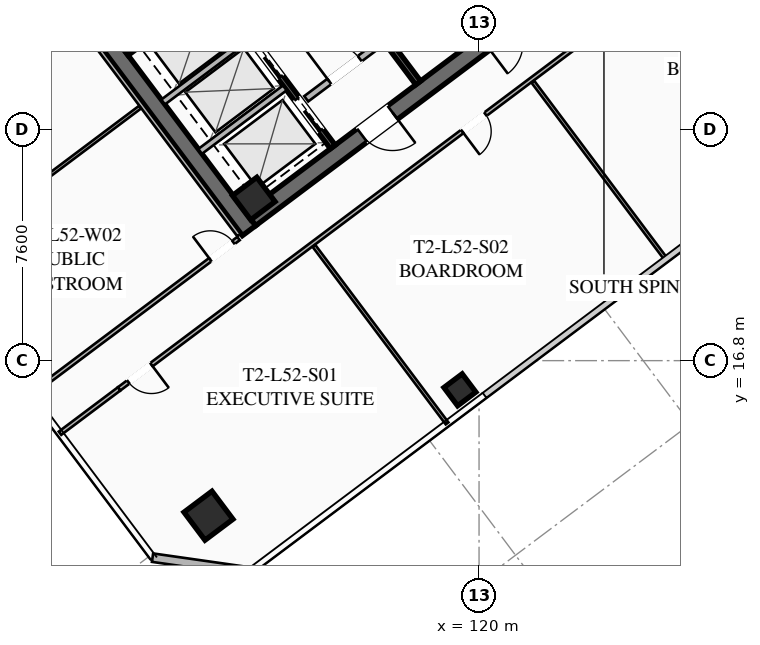
"""IFC4 building model, lengths in metres.
Left out: names, types, materials, properties, quantities, classifications, styles, units other than length and angle.
Written with IfcOpenShell. Run it as: python <this file> out.ifc"""

import sys

from ifc_helpers import new_model, si_unit, direction, frame, frame_2d, origin, origin_2d, place, context, subcontext, project, spatial, rectangle, hollow_rectangle, extrude, element, fill, save


model = new_model("IFC4")
c1 = context("Model", 3, precision=1e-05, world=origin(), true_north=direction((0.0, 1.0)))
c2 = subcontext(c1, "Body", "Model", "MODEL_VIEW")
j1 = project(units=[si_unit("LENGTHUNIT", "METRE"), si_unit("PLANEANGLEUNIT", "RADIAN")], contexts=[c1])
p1 = place(None, origin())
s1 = spatial("IfcSite", under=j1, at=p1, CompositionType="ELEMENT")
p2 = place(p1, origin())
s2 = spatial("IfcBuilding", under=s1, at=p2, CompositionType="ELEMENT")
p3 = place(p2, frame((0.0, 0.0, 192.5)))
s3 = spatial("IfcBuildingStorey", under=s2, at=p3, CompositionType="ELEMENT", Elevation=192.5)
p4 = place(p3, frame((112.436, 21.077, 0.0), z_axis=(0.0, 0.0, 1.0), x_axis=(-0.600005007985, 0.799996243986, 0.0)))
e1 = element("IfcWall", 1, at=p4, inside=s3, PredefinedType="SHEAR", context=c2, shape_type="SweptSolid", body=[
    extrude(rectangle(XDim=15.6, YDim=0.55, at=frame_2d((7.8, 0.0))), origin(), (0.0, 0.0, 1.0), 3.55),
])
p5 = place(p3, frame((124.539, 30.498, 0.0), z_axis=(0.0, 0.0, 1.0), x_axis=(-0.799998054672, -0.600002593761, 0.0)))
e2 = element("IfcWall", 2, at=p5, inside=s3, PredefinedType="SHEAR", context=c2, shape_type="SweptSolid", body=[
    extrude(rectangle(XDim=15.06, YDim=0.55, at=frame_2d((7.53, 0.0))), origin(), (0.0, 0.0, 1.0), 3.55),
])
p6 = place(p5, frame((9.23, 0.0, 0.0)))
e3 = element("IfcOpeningElement", 3, at=p6, cuts=e2, PredefinedType="OPENING", context=c2, shape_type="SweptSolid", body=[
    extrude(rectangle(XDim=1.25, YDim=2.25, at=frame_2d((0.625, 1.125))), frame((0.0, 0.285, 0.0), z_axis=(0.0, -1.0, 0.0), x_axis=(1.0, 0.0, 0.0)), (0.0, 0.0, 1.0), 0.57),
])
p7 = place(p5, frame((4.18, 0.0, 0.0)))
e4 = element("IfcOpeningElement", 4, at=p7, cuts=e2, PredefinedType="OPENING", context=c2, shape_type="SweptSolid", body=[
    extrude(rectangle(XDim=1.25, YDim=2.25, at=frame_2d((0.625, 1.125))), frame((0.0, 0.285, 0.0), z_axis=(0.0, -1.0, 0.0), x_axis=(1.0, 0.0, 0.0)), (0.0, 0.0, 1.0), 0.57),
])
p8 = place(p3, frame((112.59, 22.13, 0.0), z_axis=(0.0, 0.0, 1.0), x_axis=(0.799999996291, 0.600000004945, 0.0)))
e5 = element("IfcColumn", 5, at=p8, inside=s3, PredefinedType="COLUMN", context=c2, shape_type="SweptSolid", body=[
    extrude(hollow_rectangle(XDim=1.0, YDim=1.0, WallThickness=0.04, at=origin_2d()), origin(), (0.0, 0.0, 1.0), 3.37),
])
p9 = place(p3, frame((111.1, 11.7, 0.0), z_axis=(0.0, 0.0, 1.0), x_axis=(0.799999996291, 0.600000004945, 0.0)))
e6 = element("IfcColumn", 6, at=p9, inside=s3, PredefinedType="COLUMN", context=c2, shape_type="SweptSolid", body=[
    extrude(hollow_rectangle(XDim=1.15, YDim=1.15, WallThickness=0.045, at=origin_2d()), origin(), (0.0, 0.0, 1.0), 3.37),
])
p10 = place(p3, frame((119.37, 15.84, 0.0), z_axis=(0.0, 0.0, 1.0), x_axis=(0.799999996291, 0.600000004945, 0.0)))
e7 = element("IfcColumn", 7, at=p10, inside=s3, PredefinedType="COLUMN", context=c2, shape_type="SweptSolid", body=[
    extrude(hollow_rectangle(XDim=0.75, YDim=0.75, WallThickness=0.032, at=origin_2d()), origin(), (0.0, 0.0, 1.0), 3.37),
])
p11 = place(p3, frame((112.48, 9.86, 0.0), z_axis=(0.0, 0.0, 1.0), x_axis=(-0.989950994782, 0.141410847992, 0.0)))
e8 = element("IfcWall", 8, at=p11, inside=s3, PredefinedType="SOLIDWALL", context=c2, shape_type="SweptSolid", body=[
    extrude(rectangle(XDim=3.253, YDim=0.28, at=frame_2d((1.626, 0.0))), origin(), (0.0, 0.0, 1.0), 3.37),
])
p12 = place(p3, frame((108.396, 26.922, 0.0), z_axis=(0.0, 0.0, 1.0), x_axis=(0.800015298837, 0.599979601008, 0.0)))
e9 = element("IfcWall", 9, at=p12, inside=s3, PredefinedType="SHEAR", context=c2, shape_type="SweptSolid", body=[
    extrude(rectangle(XDim=3.83, YDim=0.2, at=frame_2d((1.915, 0.0))), origin(), (0.0, 0.0, 1.0), 3.37),
])
p13 = place(p3, frame((117.998, 25.936, 0.0), z_axis=(0.0, 0.0, 1.0), x_axis=(-0.600002693989, 0.799997979501, 0.0)))
e10 = element("IfcWall", 10, at=p13, inside=s3, PredefinedType="SHEAR", context=c2, shape_type="SweptSolid", body=[
    extrude(rectangle(XDim=14.5, YDim=0.2, at=frame_2d((7.25, 0.0))), origin(), (0.0, 0.0, 1.0), 3.37),
])
p14 = place(p3, frame((114.316, 25.412, 0.0), z_axis=(0.0, 0.0, 1.0), x_axis=(0.800018601094, 0.59997519774, 0.0)))
e11 = element("IfcWall", 11, at=p14, inside=s3, PredefinedType="SOLIDWALL", context=c2, shape_type="SweptSolid", body=[
    extrude(rectangle(XDim=3.15, YDim=0.22, at=frame_2d((1.575, 0.0))), origin(), (0.0, 0.0, 1.0), 2.723),
])
p15 = place(p14, frame((0.95, 0.0, 0.0)))
e12 = element("IfcOpeningElement", 12, at=p15, cuts=e11, PredefinedType="OPENING", context=c2, shape_type="SweptSolid", body=[
    extrude(rectangle(XDim=1.25, YDim=2.25, at=frame_2d((0.625, 1.125))), frame((0.0, 0.12, 0.0), z_axis=(0.0, -1.0, 0.0), x_axis=(1.0, 0.0, 0.0)), (0.0, 0.0, 1.0), 0.24),
])
p16 = place(p3, frame((115.19, 23.83, 0.0), z_axis=(0.0, 0.0, 1.0), x_axis=(-0.599993943644, 0.800004542231, 0.0)))
e13 = element("IfcWall", 13, at=p16, inside=s3, PredefinedType="SHEAR", context=c2, shape_type="SweptSolid", body=[
    extrude(rectangle(XDim=6.45, YDim=0.2, at=frame_2d((3.225, 0.0))), origin(), (0.0, 0.0, 1.0), 3.37),
])
p17 = place(p16, frame((4.875, 0.0, 0.0)))
e14 = element("IfcOpeningElement", 14, at=p17, cuts=e13, PredefinedType="OPENING", context=c2, shape_type="SweptSolid", body=[
    extrude(rectangle(XDim=1.3, YDim=2.25, at=frame_2d((0.65, 1.125))), frame((0.0, 0.11, 0.0), z_axis=(0.0, -1.0, 0.0), x_axis=(1.0, 0.0, 0.0)), (0.0, 0.0, 1.0), 0.22),
])
p18 = place(p16, frame((2.875, 0.0, 0.0)))
e15 = element("IfcOpeningElement", 15, at=p18, cuts=e13, PredefinedType="OPENING", context=c2, shape_type="SweptSolid", body=[
    extrude(rectangle(XDim=1.3, YDim=2.25, at=frame_2d((0.65, 1.125))), frame((0.0, 0.11, 0.0), z_axis=(0.0, -1.0, 0.0), x_axis=(1.0, 0.0, 0.0)), (0.0, 0.0, 1.0), 0.22),
])
p19 = place(p16, frame((0.675, 0.0, 0.0)))
e16 = element("IfcOpeningElement", 16, at=p19, cuts=e13, PredefinedType="OPENING", context=c2, shape_type="SweptSolid", body=[
    extrude(rectangle(XDim=1.3, YDim=2.25, at=frame_2d((0.65, 1.125))), frame((0.0, 0.11, 0.0), z_axis=(0.0, -1.0, 0.0), x_axis=(1.0, 0.0, 0.0)), (0.0, 0.0, 1.0), 0.22),
])
for number, where, z_axis, x_axis in (
    (17, (110.826, 23.682, 0.0), (0.0, 0.0, 1.0), (0.8, 0.6, 0.0)),
    (18, (109.608, 25.306, 0.0), (0.0, 0.0, 1.0), (0.8, 0.6, 0.0)),
):
    element("IfcWall", number, at=place(p3, frame(where, z_axis=z_axis, x_axis=x_axis)), inside=s3, PredefinedType="SOLIDWALL", context=c2, shape_type="SweptSolid", body=[
        extrude(rectangle(XDim=3.48, YDim=0.2, at=frame_2d((1.74, 0.0))), origin(), (0.0, 0.0, 1.0), 3.37),
    ])
p20 = place(p3, frame((131.12, 33.09, 0.0), z_axis=(0.0, 0.0, 1.0), x_axis=(-0.800003062365, -0.599995916825, 0.0)))
e19 = element("IfcWall", 19, at=p20, inside=s3, PredefinedType="PARTITIONING", context=c2, shape_type="SweptSolid", body=[
    extrude(rectangle(XDim=28.7, YDim=0.135, at=frame_2d((14.35, 0.0))), origin(), (0.0, 0.0, 1.0), 2.723),
])
p21 = place(p20, frame((27.37, 0.0, 0.0)))
e20 = element("IfcOpeningElement", 20, at=p21, cuts=e19, PredefinedType="OPENING", context=c2, shape_type="SweptSolid", body=[
    extrude(rectangle(XDim=0.95, YDim=2.05, at=frame_2d((0.475, 1.025))), frame((0.0, 0.077, 0.0), z_axis=(0.0, -1.0, 0.0), x_axis=(1.0, 0.0, 0.0)), (0.0, 0.0, 1.0), 0.155),
])
p22 = place(p20, frame((13.638, 0.0, 0.0)))
e21 = element("IfcOpeningElement", 21, at=p22, cuts=e19, PredefinedType="OPENING", context=c2, shape_type="SweptSolid", body=[
    extrude(rectangle(XDim=0.95, YDim=2.05, at=frame_2d((0.475, 1.025))), frame((0.0, 0.077, 0.0), z_axis=(0.0, -1.0, 0.0), x_axis=(1.0, 0.0, 0.0)), (0.0, 0.0, 1.0), 0.155),
])
p23 = place(p20, frame((0.38, 0.0, 0.0)))
e22 = element("IfcOpeningElement", 22, at=p23, cuts=e19, PredefinedType="OPENING", context=c2, shape_type="SweptSolid", body=[
    extrude(rectangle(XDim=0.95, YDim=2.05, at=frame_2d((0.475, 1.025))), frame((0.0, 0.077, 0.0), z_axis=(0.0, -1.0, 0.0), x_axis=(1.0, 0.0, 0.0)), (0.0, 0.0, 1.0), 0.155),
])
p24 = place(p3, frame((106.216, 14.412, 0.0), z_axis=(0.0, 0.0, 1.0), x_axis=(0.799975885537, 0.600032151272, 0.0)))
e23 = element("IfcWall", 23, at=p24, inside=s3, PredefinedType="PARTITIONING", context=c2, shape_type="SweptSolid", body=[
    extrude(rectangle(XDim=2.43, YDim=0.135, at=frame_2d((1.215, 0.0))), origin(), (0.0, 0.0, 1.0), 2.723),
])
p25 = place(p3, frame((118.948, 14.736, 0.0), z_axis=(0.0, 0.0, 1.0), x_axis=(-0.6, 0.8, 0.0)))
e24 = element("IfcWall", 24, at=p25, inside=s3, PredefinedType="PARTITIONING", context=c2, shape_type="SweptSolid", body=[
    extrude(rectangle(XDim=7.3, YDim=0.11, at=frame_2d((3.65, 0.0))), origin(), (0.0, 0.0, 1.0), 2.723),
])
p26 = place(p3, frame((126.148, 20.136, 0.0), z_axis=(0.0, 0.0, 1.0), x_axis=(-0.599983946797, 0.800012039651, 0.0)))
e25 = element("IfcWall", 25, at=p26, inside=s3, PredefinedType="PARTITIONING", context=c2, shape_type="SweptSolid", body=[
    extrude(rectangle(XDim=7.3, YDim=0.11, at=frame_2d((3.65, 0.0))), origin(), (0.0, 0.0, 1.0), 2.723),
])
p27 = place(p3, frame((112.104, 20.928, 0.0), z_axis=(0.0, 0.0, 1.0), x_axis=(-0.599994940075, 0.800003794918, 0.0)))
e26 = element("IfcWall", 26, at=p27, inside=s3, PredefinedType="PARTITIONING", context=c2, shape_type="SweptSolid", body=[
    extrude(rectangle(XDim=15.44, YDim=0.135, at=frame_2d((7.72, 0.0))), origin(), (0.0, 0.0, 1.0), 2.723),
])
p28 = place(p3, frame((105.256, 15.692, 0.0), z_axis=(0.0, 0.0, 1.0), x_axis=(0.799989708052, 0.600013722352, 0.0)))
e27 = element("IfcWall", 27, at=p28, inside=s3, PredefinedType="PARTITIONING", context=c2, shape_type="SweptSolid", body=[
    extrude(rectangle(XDim=8.54, YDim=0.135, at=frame_2d((4.27, 0.0))), origin(), (0.0, 0.0, 1.0), 2.723),
])
p29 = place(p28, frame((7.38, 0.0, 0.0)))
e28 = element("IfcOpeningElement", 28, at=p29, cuts=e27, PredefinedType="OPENING", context=c2, shape_type="SweptSolid", body=[
    extrude(rectangle(XDim=0.95, YDim=2.05, at=frame_2d((0.475, 1.025))), frame((0.0, 0.077, 0.0), z_axis=(0.0, -1.0, 0.0), x_axis=(1.0, 0.0, 0.0)), (0.0, 0.0, 1.0), 0.155),
])
p30 = place(p3, frame((102.016, 20.012, 0.0), z_axis=(0.0, 0.0, 1.0), x_axis=(0.799989708052, 0.600013722352, 0.0)))
e29 = element("IfcWall", 29, at=p30, inside=s3, PredefinedType="PARTITIONING", context=c2, shape_type="SweptSolid", body=[
    extrude(rectangle(XDim=8.54, YDim=0.11, at=frame_2d((4.27, 0.0))), origin(), (0.0, 0.0, 1.0), 2.723),
])
p31 = place(p6, origin())
e30 = element("IfcDoor", 30, at=p31, inside=s3, OperationType="SINGLE_SWING_LEFT", PredefinedType="DOOR", context=c2, shape_type="SweptSolid", body=[
    extrude(rectangle(XDim=1.25, YDim=2.25, at=frame_2d((0.625, 1.125))), frame((0.0, 0.025, 0.0), z_axis=(0.0, -1.0, 0.0), x_axis=(1.0, 0.0, 0.0)), (0.0, 0.0, 1.0), 0.05),
])
fill(e3, e30)
p32 = place(p15, origin())
e31 = element("IfcDoor", 31, at=p32, inside=s3, OperationType="SINGLE_SWING_LEFT", PredefinedType="DOOR", context=c2, shape_type="SweptSolid", body=[
    extrude(rectangle(XDim=1.25, YDim=2.25, at=frame_2d((0.625, 1.125))), frame((0.0, 0.025, 0.0), z_axis=(0.0, -1.0, 0.0), x_axis=(1.0, 0.0, 0.0)), (0.0, 0.0, 1.0), 0.05),
])
fill(e12, e31)
p33 = place(p21, origin())
e32 = element("IfcDoor", 32, at=p33, inside=s3, OperationType="SINGLE_SWING_LEFT", PredefinedType="DOOR", context=c2, shape_type="SweptSolid", body=[
    extrude(rectangle(XDim=0.95, YDim=2.05, at=frame_2d((0.475, 1.025))), frame((0.0, 0.025, 0.0), z_axis=(0.0, -1.0, 0.0), x_axis=(1.0, 0.0, 0.0)), (0.0, 0.0, 1.0), 0.05),
])
fill(e20, e32)
p34 = place(p22, origin())
e33 = element("IfcDoor", 33, at=p34, inside=s3, OperationType="SINGLE_SWING_RIGHT", PredefinedType="DOOR", context=c2, shape_type="SweptSolid", body=[
    extrude(rectangle(XDim=0.95, YDim=2.05, at=frame_2d((0.475, 1.025))), frame((0.0, 0.025, 0.0), z_axis=(0.0, -1.0, 0.0), x_axis=(1.0, 0.0, 0.0)), (0.0, 0.0, 1.0), 0.05),
])
fill(e21, e33)
p35 = place(p29, origin())
e34 = element("IfcDoor", 34, at=p35, inside=s3, OperationType="SINGLE_SWING_LEFT", PredefinedType="DOOR", context=c2, shape_type="SweptSolid", body=[
    extrude(rectangle(XDim=0.95, YDim=2.05, at=frame_2d((0.475, 1.025))), frame((0.0, 0.025, 0.0), z_axis=(0.0, -1.0, 0.0), x_axis=(1.0, 0.0, 0.0)), (0.0, 0.0, 1.0), 0.05),
])
fill(e28, e34)
p36 = place(p18, origin())
e35 = element("IfcDoor", 35, at=p36, inside=s3, OperationType="SLIDING_TO_LEFT", PredefinedType="DOOR", context=c2, shape_type="SweptSolid", body=[
    extrude(rectangle(XDim=1.3, YDim=2.25, at=frame_2d((0.65, 1.125))), frame((0.0, 0.025, 0.0), z_axis=(0.0, -1.0, 0.0), x_axis=(1.0, 0.0, 0.0)), (0.0, 0.0, 1.0), 0.05),
])
fill(e15, e35)
p37 = place(p19, origin())
e36 = element("IfcDoor", 36, at=p37, inside=s3, OperationType="SLIDING_TO_LEFT", PredefinedType="DOOR", context=c2, shape_type="SweptSolid", body=[
    extrude(rectangle(XDim=1.3, YDim=2.25, at=frame_2d((0.65, 1.125))), frame((0.0, 0.025, 0.0), z_axis=(0.0, -1.0, 0.0), x_axis=(1.0, 0.0, 0.0)), (0.0, 0.0, 1.0), 0.05),
])
fill(e16, e36)
save(model, sys.argv[1])
